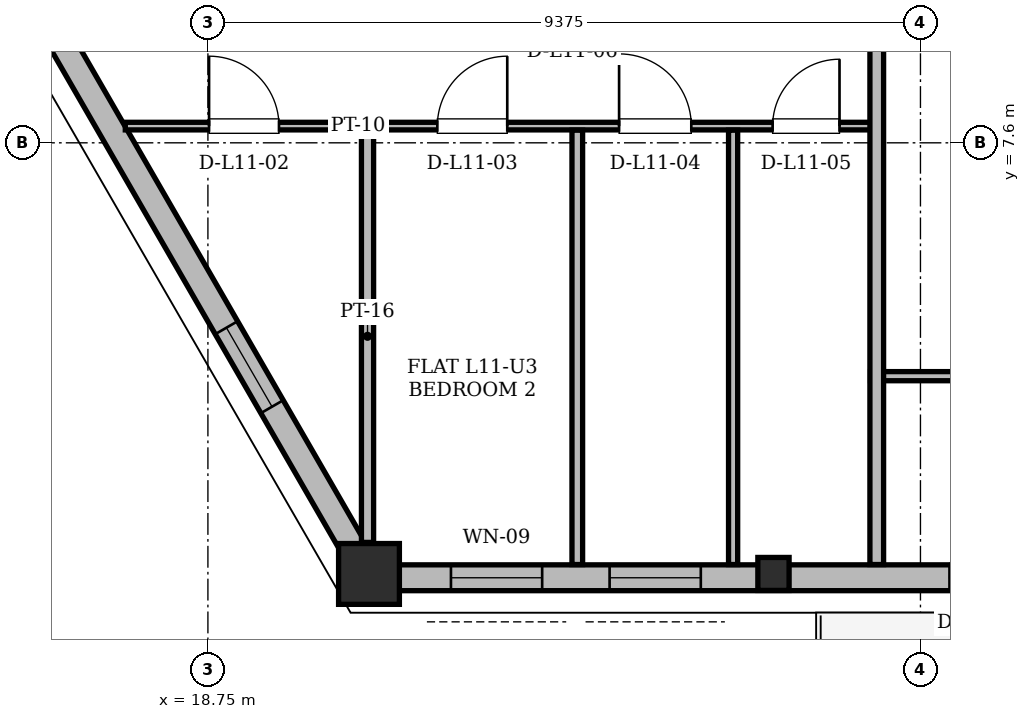
"""IFC4 building model, lengths in metres.
Left out: names, types, materials, properties, quantities, classifications, styles, units other than length and angle.
Written with IfcOpenShell. Run it as: python <this file> out.ifc"""

import sys

from ifc_helpers import new_model, si_unit, direction, frame, frame_2d, origin, origin_2d, place, context, subcontext, project, spatial, rectangle, hollow_rectangle, i_section, extrude, element, fill, save


model = new_model("IFC4")
c1 = context("Model", 3, precision=1e-05, world=origin(), true_north=direction((0.0, 1.0)))
c2 = subcontext(c1, "Body", "Model", "MODEL_VIEW")
j1 = project(units=[si_unit("LENGTHUNIT", "METRE"), si_unit("PLANEANGLEUNIT", "RADIAN")], contexts=[c1])
p1 = place(None, origin())
s1 = spatial("IfcSite", under=j1, at=p1, CompositionType="ELEMENT")
p2 = place(p1, origin())
s2 = spatial("IfcBuilding", under=s1, at=p2, CompositionType="ELEMENT")
p3 = place(p2, frame((0.0, 0.0, 45.3)))
s3 = spatial("IfcBuildingStorey", under=s2, at=p3, CompositionType="ELEMENT", Elevation=45.3)
p4 = place(p3, frame((20.893, 1.878, 0.004), z_axis=(-0.013114946071, 0.027996672441, 0.999521978008), x_axis=(-0.90556449507, -0.424208610555, 0.0)))
e1 = element("IfcColumn", 1, at=p4, inside=s3, PredefinedType="COLUMN", context=c2, shape_type="SweptSolid", body=[
    extrude(hollow_rectangle(XDim=0.8, YDim=0.8, WallThickness=0.065, at=origin_2d()), origin(), (0.0, 0.0, 1.0), 3.593),
])
p5 = place(p3, frame((26.207, 1.878, 0.004), z_axis=(-0.008970218271, 0.027997953998, 0.99956773145), x_axis=(-0.952316734925, -0.305111186918, 0.0)))
e2 = element("IfcColumn", 2, at=p5, inside=s3, PredefinedType="COLUMN", context=c2, shape_type="SweptSolid", body=[
    extrude(i_section(OverallWidth=0.411, OverallDepth=0.434, WebThickness=0.036, FlangeThickness=0.057, at=origin_2d()), origin(), (0.0, 0.0, 1.0), 3.593),
])
p6 = place(p3, frame((13.416, 14.829, 0.0), z_axis=(0.0, 0.0, 1.0), x_axis=(0.499989538455, -0.866031443676, 0.0)))
e3 = element("IfcWall", 3, at=p6, inside=s3, PredefinedType="SOLIDWALL", context=c2, shape_type="SweptSolid", body=[
    extrude(rectangle(XDim=14.955, YDim=0.34, at=frame_2d((7.478, 0.0))), origin(), (0.0, 0.0, 1.0), 2.494),
])
p7 = place(p6, frame((4.918, 0.0, 0.85)))
e4 = element("IfcOpeningElement", 4, at=p7, cuts=e3, PredefinedType="OPENING", context=c2, shape_type="SweptSolid", body=[
    extrude(rectangle(XDim=1.2, YDim=1.48, at=frame_2d((0.6, 0.74))), frame((0.0, 0.17, 0.0), z_axis=(0.0, -1.0, 0.0), x_axis=(1.0, 0.0, 0.0)), (0.0, 0.0, 1.0), 0.34),
])
p8 = place(p6, frame((11.156, 0.0, 0.85)))
e5 = element("IfcOpeningElement", 5, at=p8, cuts=e3, PredefinedType="OPENING", context=c2, shape_type="SweptSolid", body=[
    extrude(rectangle(XDim=1.2, YDim=1.48, at=frame_2d((0.6, 0.74))), frame((0.0, 0.17, 0.0), z_axis=(0.0, -1.0, 0.0), x_axis=(1.0, 0.0, 0.0)), (0.0, 0.0, 1.0), 0.34),
])
p9 = place(p3, frame((20.893, 1.878, 0.0), z_axis=(0.0, 0.0, 1.0), x_axis=(1.0, 0.0, 0.0)))
e6 = element("IfcWall", 6, at=p9, inside=s3, PredefinedType="SOLIDWALL", context=c2, shape_type="SweptSolid", body=[
    extrude(rectangle(XDim=33.214, YDim=0.34, at=frame_2d((16.607, 0.0))), origin(), (0.0, 0.0, 1.0), 2.494),
])
p10 = place(p9, frame((7.615, 0.0, 0.0)))
e7 = element("IfcOpeningElement", 7, at=p10, cuts=e6, PredefinedType="OPENING", context=c2, shape_type="SweptSolid", body=[
    extrude(rectangle(XDim=1.5, YDim=2.2, at=frame_2d((0.75, 1.1))), frame((0.0, 0.17, 0.0), z_axis=(0.0, -1.0, 0.0), x_axis=(1.0, 0.0, 0.0)), (0.0, 0.0, 1.0), 0.34),
])
p11 = place(p9, frame((25.345, 0.0, 0.0)))
e8 = element("IfcOpeningElement", 8, at=p11, cuts=e6, PredefinedType="OPENING", context=c2, shape_type="SweptSolid", body=[
    extrude(rectangle(XDim=1.5, YDim=2.2, at=frame_2d((0.75, 1.1))), frame((0.0, 0.17, 0.0), z_axis=(0.0, -1.0, 0.0), x_axis=(1.0, 0.0, 0.0)), (0.0, 0.0, 1.0), 0.34),
])
p12 = place(p9, frame((12.596, 0.0, 0.85)))
e9 = element("IfcOpeningElement", 9, at=p12, cuts=e6, PredefinedType="OPENING", context=c2, shape_type="SweptSolid", body=[
    extrude(rectangle(XDim=1.6, YDim=1.534, at=frame_2d((0.8, 0.767))), frame((0.0, 0.17, 0.0), z_axis=(0.0, -1.0, 0.0), x_axis=(1.0, 0.0, 0.0)), (0.0, 0.0, 1.0), 0.34),
])
p13 = place(p9, frame((15.161, 0.0, 0.85)))
e10 = element("IfcOpeningElement", 10, at=p13, cuts=e6, PredefinedType="OPENING", context=c2, shape_type="SweptSolid", body=[
    extrude(rectangle(XDim=2.0, YDim=1.534, at=frame_2d((1.0, 0.767))), frame((0.0, 0.17, 0.0), z_axis=(0.0, -1.0, 0.0), x_axis=(1.0, 0.0, 0.0)), (0.0, 0.0, 1.0), 0.34),
])
p14 = place(p9, frame((20.571, 0.0, 0.85)))
e11 = element("IfcOpeningElement", 11, at=p14, cuts=e6, PredefinedType="OPENING", context=c2, shape_type="SweptSolid", body=[
    extrude(rectangle(XDim=1.4, YDim=1.534, at=frame_2d((0.7, 0.767))), frame((0.0, 0.17, 0.0), z_axis=(0.0, -1.0, 0.0), x_axis=(1.0, 0.0, 0.0)), (0.0, 0.0, 1.0), 0.34),
])
p15 = place(p9, frame((1.055, 0.0, 0.85)))
e12 = element("IfcOpeningElement", 12, at=p15, cuts=e6, PredefinedType="OPENING", context=c2, shape_type="SweptSolid", body=[
    extrude(rectangle(XDim=1.2, YDim=1.48, at=frame_2d((0.6, 0.74))), frame((0.0, 0.17, 0.0), z_axis=(0.0, -1.0, 0.0), x_axis=(1.0, 0.0, 0.0)), (0.0, 0.0, 1.0), 0.34),
])
p16 = place(p9, frame((3.142, 0.0, 0.85)))
e13 = element("IfcOpeningElement", 13, at=p16, cuts=e6, PredefinedType="OPENING", context=c2, shape_type="SweptSolid", body=[
    extrude(rectangle(XDim=1.2, YDim=1.48, at=frame_2d((0.6, 0.74))), frame((0.0, 0.17, 0.0), z_axis=(0.0, -1.0, 0.0), x_axis=(1.0, 0.0, 0.0)), (0.0, 0.0, 1.0), 0.34),
])
p17 = place(p9, frame((30.174, 0.0, 0.85)))
e14 = element("IfcOpeningElement", 14, at=p17, cuts=e6, PredefinedType="OPENING", context=c2, shape_type="SweptSolid", body=[
    extrude(rectangle(XDim=1.6, YDim=1.534, at=frame_2d((0.8, 0.767))), frame((0.0, 0.17, 0.0), z_axis=(0.0, -1.0, 0.0), x_axis=(1.0, 0.0, 0.0)), (0.0, 0.0, 1.0), 0.34),
])
p18 = place(p3, frame((27.468, 4.53, 0.0), z_axis=(0.0, 0.0, 1.0), x_axis=(1.0, 0.0, 0.0)))
e15 = element("IfcWall", 15, at=p18, inside=s3, PredefinedType="PARTITIONING", context=c2, shape_type="SweptSolid", body=[
    extrude(rectangle(XDim=8.114, YDim=0.12, at=frame_2d((4.057, 0.0))), origin(), (0.0, 0.0, 1.0), 2.946),
])
p19 = place(p18, frame((3.617, 0.0, 0.0)))
e16 = element("IfcOpeningElement", 16, at=p19, cuts=e15, PredefinedType="OPENING", context=c2, shape_type="SweptSolid", body=[
    extrude(rectangle(XDim=0.88, YDim=2.08, at=frame_2d((0.44, 1.04))), frame((0.0, 0.06, 0.0), z_axis=(0.0, -1.0, 0.0), x_axis=(1.0, 0.0, 0.0)), (0.0, 0.0, 1.0), 0.12),
])
p20 = place(p3, frame((17.663, 7.82, 0.0), z_axis=(0.0, 0.0, 1.0), x_axis=(1.0, 0.0, 0.0)))
e17 = element("IfcWall", 17, at=p20, inside=s3, PredefinedType="PARTITIONING", context=c2, shape_type="SweptSolid", body=[
    extrude(rectangle(XDim=9.937, YDim=0.1, at=frame_2d((4.969, 0.0))), origin(), (0.0, 0.0, 1.0), 2.738),
])
p21 = place(p20, frame((1.102, 0.0, 0.0)))
e18 = element("IfcOpeningElement", 18, at=p21, cuts=e17, PredefinedType="OPENING", context=c2, shape_type="SweptSolid", body=[
    extrude(rectangle(XDim=0.92, YDim=2.12, at=frame_2d((0.46, 1.06))), frame((0.0, 0.05, 0.0), z_axis=(0.0, -1.0, 0.0), x_axis=(1.0, 0.0, 0.0)), (0.0, 0.0, 1.0), 0.1),
])
p22 = place(p20, frame((4.105, 0.0, 0.0)))
e19 = element("IfcOpeningElement", 19, at=p22, cuts=e17, PredefinedType="OPENING", context=c2, shape_type="SweptSolid", body=[
    extrude(rectangle(XDim=0.92, YDim=2.12, at=frame_2d((0.46, 1.06))), frame((0.0, 0.05, 0.0), z_axis=(0.0, -1.0, 0.0), x_axis=(1.0, 0.0, 0.0)), (0.0, 0.0, 1.0), 0.1),
])
p23 = place(p20, frame((6.497, 0.0, 0.0)))
e20 = element("IfcOpeningElement", 20, at=p23, cuts=e17, PredefinedType="OPENING", context=c2, shape_type="SweptSolid", body=[
    extrude(rectangle(XDim=0.95, YDim=2.1, at=frame_2d((0.475, 1.05))), frame((0.0, 0.05, 0.0), z_axis=(0.0, -1.0, 0.0), x_axis=(1.0, 0.0, 0.0)), (0.0, 0.0, 1.0), 0.1),
])
p24 = place(p20, frame((8.517, 0.0, 0.0)))
e21 = element("IfcOpeningElement", 21, at=p24, cuts=e17, PredefinedType="OPENING", context=c2, shape_type="SweptSolid", body=[
    extrude(rectangle(XDim=0.88, YDim=2.08, at=frame_2d((0.44, 1.04))), frame((0.0, 0.05, 0.0), z_axis=(0.0, -1.0, 0.0), x_axis=(1.0, 0.0, 0.0)), (0.0, 0.0, 1.0), 0.1),
])
p25 = place(p3, frame((20.85, 2.343, 0.0), z_axis=(0.0, 0.0, 1.0), x_axis=(0.0, 1.0, 0.0)))
e22 = element("IfcWall", 22, at=p25, inside=s3, PredefinedType="PARTITIONING", context=c2, shape_type="SweptSolid", body=[
    extrude(rectangle(XDim=5.423, YDim=0.16, at=frame_2d((2.711, 0.0))), origin(), (0.0, 0.0, 1.0), 3.36),
])
p26 = place(p3, frame((23.61, 2.052, 0.0), z_axis=(0.0, 0.0, 1.0), x_axis=(0.0, 1.0, 0.0)))
e23 = element("IfcWall", 23, at=p26, inside=s3, PredefinedType="PARTITIONING", context=c2, shape_type="SweptSolid", body=[
    extrude(rectangle(XDim=5.714, YDim=0.14, at=frame_2d((2.857, 0.0))), origin(), (0.0, 0.0, 1.0), 2.738),
])
p27 = place(p3, frame((25.66, 2.052, 0.0), z_axis=(0.0, 0.0, 1.0), x_axis=(0.0, 1.0, 0.0)))
e24 = element("IfcWall", 24, at=p27, inside=s3, PredefinedType="PARTITIONING", context=c2, shape_type="SweptSolid", body=[
    extrude(rectangle(XDim=5.714, YDim=0.12, at=frame_2d((2.857, 0.0))), origin(), (0.0, 0.0, 1.0), 2.738),
])
p28 = place(p3, frame((27.55, 2.052, 0.0), z_axis=(0.0, 0.0, 1.0), x_axis=(0.0, 1.0, 0.0)))
e25 = element("IfcWall", 25, at=p28, inside=s3, PredefinedType="PARTITIONING", context=c2, shape_type="SweptSolid", body=[
    extrude(rectangle(XDim=7.154, YDim=0.18, at=frame_2d((3.577, 0.0))), origin(), (0.0, 0.0, 1.0), 2.738),
])
p29 = place(p10, origin())
e26 = element("IfcDoor", 26, at=p29, inside=s3, OperationType="SINGLE_SWING_RIGHT", PredefinedType="DOOR", context=c2, shape_type="SweptSolid", body=[
    extrude(rectangle(XDim=1.5, YDim=2.2, at=frame_2d((0.75, 1.1))), frame((0.0, 0.025, 0.0), z_axis=(0.0, -1.0, 0.0), x_axis=(1.0, 0.0, 0.0)), (0.0, 0.0, 1.0), 0.05),
])
fill(e7, e26)
p30 = place(p15, origin())
e27 = element("IfcWindow", 27, at=p30, inside=s3, PartitioningType="SINGLE_PANEL", PredefinedType="WINDOW", context=c2, shape_type="SweptSolid", body=[
    extrude(rectangle(XDim=1.2, YDim=1.48, at=frame_2d((0.6, 0.74))), frame((0.0, 0.03, 0.0), z_axis=(0.0, -1.0, 0.0), x_axis=(1.0, 0.0, 0.0)), (0.0, 0.0, 1.0), 0.06),
])
fill(e12, e27)
p31 = place(p16, origin())
e28 = element("IfcWindow", 28, at=p31, inside=s3, PartitioningType="SINGLE_PANEL", PredefinedType="WINDOW", context=c2, shape_type="SweptSolid", body=[
    extrude(rectangle(XDim=1.2, YDim=1.48, at=frame_2d((0.6, 0.74))), frame((0.0, 0.03, 0.0), z_axis=(0.0, -1.0, 0.0), x_axis=(1.0, 0.0, 0.0)), (0.0, 0.0, 1.0), 0.06),
])
fill(e13, e28)
p32 = place(p8, origin())
e29 = element("IfcWindow", 29, at=p32, inside=s3, PartitioningType="SINGLE_PANEL", PredefinedType="WINDOW", context=c2, shape_type="SweptSolid", body=[
    extrude(rectangle(XDim=1.2, YDim=1.48, at=frame_2d((0.6, 0.74))), frame((0.0, 0.03, 0.0), z_axis=(0.0, -1.0, 0.0), x_axis=(1.0, 0.0, 0.0)), (0.0, 0.0, 1.0), 0.06),
])
fill(e5, e29)
p33 = place(p21, origin())
e30 = element("IfcDoor", 30, at=p33, inside=s3, OperationType="SINGLE_SWING_LEFT", PredefinedType="DOOR", context=c2, shape_type="SweptSolid", body=[
    extrude(rectangle(XDim=0.92, YDim=2.12, at=frame_2d((0.46, 1.06))), frame((0.0, 0.025, 0.0), z_axis=(0.0, -1.0, 0.0), x_axis=(1.0, 0.0, 0.0)), (0.0, 0.0, 1.0), 0.05),
])
fill(e18, e30)
p34 = place(p22, origin())
e31 = element("IfcDoor", 31, at=p34, inside=s3, OperationType="SINGLE_SWING_RIGHT", PredefinedType="DOOR", context=c2, shape_type="SweptSolid", body=[
    extrude(rectangle(XDim=0.92, YDim=2.12, at=frame_2d((0.46, 1.06))), frame((0.0, 0.025, 0.0), z_axis=(0.0, -1.0, 0.0), x_axis=(1.0, 0.0, 0.0)), (0.0, 0.0, 1.0), 0.05),
])
fill(e19, e31)
p35 = place(p23, origin())
e32 = element("IfcDoor", 32, at=p35, inside=s3, OperationType="SINGLE_SWING_LEFT", PredefinedType="DOOR", context=c2, shape_type="SweptSolid", body=[
    extrude(rectangle(XDim=0.95, YDim=2.1, at=frame_2d((0.475, 1.05))), frame((0.0, 0.025, 0.0), z_axis=(0.0, -1.0, 0.0), x_axis=(1.0, 0.0, 0.0)), (0.0, 0.0, 1.0), 0.05),
])
fill(e20, e32)
p36 = place(p24, origin())
e33 = element("IfcDoor", 33, at=p36, inside=s3, OperationType="SINGLE_SWING_RIGHT", PredefinedType="DOOR", context=c2, shape_type="SweptSolid", body=[
    extrude(rectangle(XDim=0.88, YDim=2.08, at=frame_2d((0.44, 1.04))), frame((0.0, 0.025, 0.0), z_axis=(0.0, -1.0, 0.0), x_axis=(1.0, 0.0, 0.0)), (0.0, 0.0, 1.0), 0.05),
])
fill(e21, e33)
save(model, sys.argv[1])
